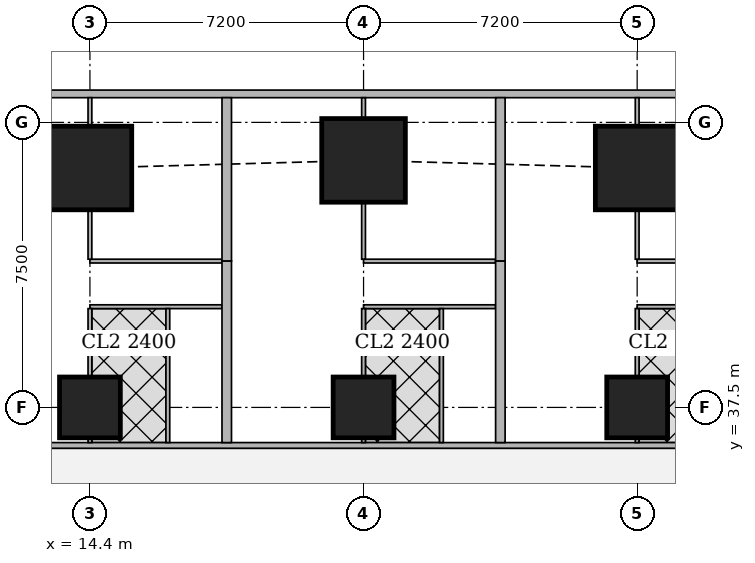
"""IFC4 building model, lengths in metres.
Left out: names, types, materials, properties, quantities, classifications, styles, units other than length and angle.
Written with IfcOpenShell. Run it as: python <this file> out.ifc"""

import sys

from ifc_helpers import new_model, si_unit, direction, frame, frame_2d, origin, origin_2d, place, context, subcontext, project, spatial, rectangle, extrude, element, fill, save


model = new_model("IFC4")
c1 = context("Model", 3, precision=1e-05, world=origin(), true_north=direction((0.0, 1.0)))
c2 = subcontext(c1, "Body", "Model", "MODEL_VIEW")
j1 = project(units=[si_unit("LENGTHUNIT", "METRE"), si_unit("PLANEANGLEUNIT", "RADIAN")], contexts=[c1])
p1 = place(None, origin())
s1 = spatial("IfcSite", under=j1, at=p1, CompositionType="ELEMENT")
p2 = place(p1, origin())
s2 = spatial("IfcBuilding", under=s1, at=p2, CompositionType="ELEMENT")
p3 = place(p2, frame((0.0, 0.0, 89.15)))
s3 = spatial("IfcBuildingStorey", under=s2, at=p3, CompositionType="ELEMENT", Elevation=89.15)
for number, where, z_axis, x_axis in (
    (1, (14.4, 37.5, 0.0), (0.0, 0.0, 1.0), (1.0, 0.0, 0.0)),
    (2, (21.6, 37.5, 0.0), (0.0, 0.0, 1.0), (1.0, 0.0, 0.0)),
    (3, (28.8, 37.5, 0.0), (0.0, 0.0, 1.0), (1.0, 0.0, 0.0)),
):
    element("IfcColumn", number, at=place(p3, frame(where, z_axis=z_axis, x_axis=x_axis)), inside=s3, PredefinedType="COLUMN", context=c2, shape_type="SweptSolid", body=[
        extrude(rectangle(XDim=1.6, YDim=1.6, at=origin_2d()), origin(), (0.0, 0.0, 1.0), 3.75),
    ])
for number, where, z_axis, x_axis in (
    (4, (14.4, 43.8, 0.0), (0.0, 0.0, 1.0), (1.0, 0.0, 0.0)),
    (5, (21.6, 44.0, 0.0), (0.0, 0.0, 1.0), (1.0, 0.0, 0.0)),
    (6, (28.8, 43.8, 0.0), (0.0, 0.0, 1.0), (1.0, 0.0, 0.0)),
):
    element("IfcColumn", number, at=place(p3, frame(where, z_axis=z_axis, x_axis=x_axis)), inside=s3, PredefinedType="COLUMN", context=c2, shape_type="SweptSolid", body=[
        extrude(rectangle(XDim=2.2, YDim=2.2, at=origin_2d()), origin(), (0.0, 0.0, 1.0), 3.75),
    ])
p4 = place(p3, frame((40.106, 45.75, 0.0), z_axis=(0.0, 0.0, 1.0), x_axis=(-1.0, 0.0, 0.0)))
e7 = element("IfcWall", 7, at=p4, inside=s3, PredefinedType="SOLIDWALL", context=c2, shape_type="SweptSolid", body=[
    extrude(rectangle(XDim=37.943, YDim=0.2, at=frame_2d((18.971, 0.0))), origin(), (0.0, 0.0, 1.0), 3.5),
])
p5 = place(p4, frame((8.606, 0.0, 0.9)))
e8 = element("IfcOpeningElement", 8, at=p5, cuts=e7, PredefinedType="OPENING", context=c2, shape_type="SweptSolid", body=[
    extrude(rectangle(XDim=1.8, YDim=1.5, at=frame_2d((0.9, 0.75))), frame((0.0, 0.11, 0.0), z_axis=(0.0, -1.0, 0.0), x_axis=(1.0, 0.0, 0.0)), (0.0, 0.0, 1.0), 0.22),
])
p6 = place(p4, frame((12.206, 0.0, 0.9)))
e9 = element("IfcOpeningElement", 9, at=p6, cuts=e7, PredefinedType="OPENING", context=c2, shape_type="SweptSolid", body=[
    extrude(rectangle(XDim=1.8, YDim=1.5, at=frame_2d((0.9, 0.75))), frame((0.0, 0.11, 0.0), z_axis=(0.0, -1.0, 0.0), x_axis=(1.0, 0.0, 0.0)), (0.0, 0.0, 1.0), 0.22),
])
p7 = place(p4, frame((15.806, 0.0, 0.9)))
e10 = element("IfcOpeningElement", 10, at=p7, cuts=e7, PredefinedType="OPENING", context=c2, shape_type="SweptSolid", body=[
    extrude(rectangle(XDim=1.8, YDim=1.5, at=frame_2d((0.9, 0.75))), frame((0.0, 0.11, 0.0), z_axis=(0.0, -1.0, 0.0), x_axis=(1.0, 0.0, 0.0)), (0.0, 0.0, 1.0), 0.22),
])
p8 = place(p4, frame((19.406, 0.0, 0.9)))
e11 = element("IfcOpeningElement", 11, at=p8, cuts=e7, PredefinedType="OPENING", context=c2, shape_type="SweptSolid", body=[
    extrude(rectangle(XDim=1.8, YDim=1.5, at=frame_2d((0.9, 0.75))), frame((0.0, 0.11, 0.0), z_axis=(0.0, -1.0, 0.0), x_axis=(1.0, 0.0, 0.0)), (0.0, 0.0, 1.0), 0.22),
])
p9 = place(p4, frame((23.006, 0.0, 0.9)))
e12 = element("IfcOpeningElement", 12, at=p9, cuts=e7, PredefinedType="OPENING", context=c2, shape_type="SweptSolid", body=[
    extrude(rectangle(XDim=1.8, YDim=1.5, at=frame_2d((0.9, 0.75))), frame((0.0, 0.11, 0.0), z_axis=(0.0, -1.0, 0.0), x_axis=(1.0, 0.0, 0.0)), (0.0, 0.0, 1.0), 0.22),
])
p10 = place(p4, frame((26.606, 0.0, 0.9)))
e13 = element("IfcOpeningElement", 13, at=p10, cuts=e7, PredefinedType="OPENING", context=c2, shape_type="SweptSolid", body=[
    extrude(rectangle(XDim=1.8, YDim=1.5, at=frame_2d((0.9, 0.75))), frame((0.0, 0.11, 0.0), z_axis=(0.0, -1.0, 0.0), x_axis=(1.0, 0.0, 0.0)), (0.0, 0.0, 1.0), 0.22),
])
p11 = place(p3, frame((8.35, 36.5, 0.0), z_axis=(0.0, 0.0, 1.0), x_axis=(1.0, 0.0, 0.0)))
e14 = element("IfcWall", 14, at=p11, inside=s3, PredefinedType="SOLIDWALL", context=c2, shape_type="SweptSolid", body=[
    extrude(rectangle(XDim=26.415, YDim=0.15, at=frame_2d((13.208, 0.0))), origin(), (0.0, 0.0, 1.0), 3.5),
])
p12 = place(p11, frame((2.6, 0.0, 0.0)))
e15 = element("IfcOpeningElement", 15, at=p12, cuts=e14, PredefinedType="OPENING", context=c2, shape_type="SweptSolid", body=[
    extrude(rectangle(XDim=1.0, YDim=2.1, at=frame_2d((0.5, 1.05))), frame((0.0, 0.085, 0.0), z_axis=(0.0, -1.0, 0.0), x_axis=(1.0, 0.0, 0.0)), (0.0, 0.0, 1.0), 0.17),
])
p13 = place(p11, frame((10.75, 0.0, 0.0)))
e16 = element("IfcOpeningElement", 16, at=p13, cuts=e14, PredefinedType="OPENING", context=c2, shape_type="SweptSolid", body=[
    extrude(rectangle(XDim=1.0, YDim=2.1, at=frame_2d((0.5, 1.05))), frame((0.0, 0.085, 0.0), z_axis=(0.0, -1.0, 0.0), x_axis=(1.0, 0.0, 0.0)), (0.0, 0.0, 1.0), 0.17),
])
p14 = place(p11, frame((18.007, 0.0, 0.0)))
e17 = element("IfcOpeningElement", 17, at=p14, cuts=e14, PredefinedType="OPENING", context=c2, shape_type="SweptSolid", body=[
    extrude(rectangle(XDim=1.0, YDim=2.1, at=frame_2d((0.5, 1.05))), frame((0.0, 0.085, 0.0), z_axis=(0.0, -1.0, 0.0), x_axis=(1.0, 0.0, 0.0)), (0.0, 0.0, 1.0), 0.17),
])
p15 = place(p3, frame((14.4, 41.35, 0.0), z_axis=(0.0, 0.0, 1.0), x_axis=(1.0, 0.0, 0.0)))
e18 = element("IfcWall", 18, at=p15, inside=s3, PredefinedType="PARTITIONING", context=c2, shape_type="SweptSolid", body=[
    extrude(rectangle(XDim=3.475, YDim=0.1, at=frame_2d((1.738, 0.0))), origin(), (0.0, 0.0, 1.0), 3.5),
])
p16 = place(p15, frame((0.2, 0.0, 0.0)))
e19 = element("IfcOpeningElement", 19, at=p16, cuts=e18, PredefinedType="OPENING", context=c2, shape_type="SweptSolid", body=[
    extrude(rectangle(XDim=0.9, YDim=2.1, at=frame_2d((0.45, 1.05))), frame((0.0, 0.06, 0.0), z_axis=(0.0, -1.0, 0.0), x_axis=(1.0, 0.0, 0.0)), (0.0, 0.0, 1.0), 0.12),
])
p17 = place(p3, frame((14.4, 40.15, 0.0), z_axis=(0.0, 0.0, 1.0), x_axis=(1.0, 0.0, 0.0)))
e20 = element("IfcWall", 20, at=p17, inside=s3, PredefinedType="PARTITIONING", context=c2, shape_type="SweptSolid", body=[
    extrude(rectangle(XDim=3.475, YDim=0.1, at=frame_2d((1.738, 0.0))), origin(), (0.0, 0.0, 1.0), 3.5),
])
p18 = place(p17, frame((0.575, 0.0, 0.0)))
e21 = element("IfcOpeningElement", 21, at=p18, cuts=e20, PredefinedType="OPENING", context=c2, shape_type="SweptSolid", body=[
    extrude(rectangle(XDim=0.9, YDim=2.1, at=frame_2d((0.45, 1.05))), frame((0.0, 0.06, 0.0), z_axis=(0.0, -1.0, 0.0), x_axis=(1.0, 0.0, 0.0)), (0.0, 0.0, 1.0), 0.12),
])
p19 = place(p17, frame((2.375, 0.0, 0.0)))
e22 = element("IfcOpeningElement", 22, at=p19, cuts=e20, PredefinedType="OPENING", context=c2, shape_type="SweptSolid", body=[
    extrude(rectangle(XDim=0.9, YDim=2.1, at=frame_2d((0.45, 1.05))), frame((0.0, 0.06, 0.0), z_axis=(0.0, -1.0, 0.0), x_axis=(1.0, 0.0, 0.0)), (0.0, 0.0, 1.0), 0.12),
])
p20 = place(p3, frame((14.4, 41.4, 0.0), z_axis=(0.0, 0.0, 1.0), x_axis=(0.0, 1.0, 0.0)))
e23 = element("IfcWall", 23, at=p20, inside=s3, PredefinedType="PARTITIONING", context=c2, shape_type="SweptSolid", body=[
    extrude(rectangle(XDim=1.299, YDim=0.1, at=frame_2d((0.649, 0.0))), origin(), (0.0, 0.0, 1.0), 3.5),
])
p21 = place(p3, frame((14.4, 44.901, 0.0), z_axis=(0.0, 0.0, 1.0), x_axis=(0.0, 1.0, 0.0)))
e24 = element("IfcWall", 24, at=p21, inside=s3, PredefinedType="PARTITIONING", context=c2, shape_type="SweptSolid", body=[
    extrude(rectangle(XDim=0.749, YDim=0.1, at=frame_2d((0.375, 0.0))), origin(), (0.0, 0.0, 1.0), 3.5),
])
p22 = place(p3, frame((14.4, 36.575, 0.0), z_axis=(0.0, 0.0, 1.0), x_axis=(0.0, 1.0, 0.0)))
e25 = element("IfcWall", 25, at=p22, inside=s3, PredefinedType="PARTITIONING", context=c2, shape_type="SweptSolid", body=[
    extrude(rectangle(XDim=0.124, YDim=0.1, at=frame_2d((0.062, 0.0))), origin(), (0.0, 0.0, 1.0), 3.5),
])
p23 = place(p3, frame((14.4, 38.301, 0.0), z_axis=(0.0, 0.0, 1.0), x_axis=(0.0, 1.0, 0.0)))
e26 = element("IfcWall", 26, at=p23, inside=s3, PredefinedType="PARTITIONING", context=c2, shape_type="SweptSolid", body=[
    extrude(rectangle(XDim=1.799, YDim=0.1, at=frame_2d((0.899, 0.0))), origin(), (0.0, 0.0, 1.0), 3.5),
])
p24 = place(p3, frame((16.45, 36.575, 0.0), z_axis=(0.0, 0.0, 1.0), x_axis=(0.0, 1.0, 0.0)))
e27 = element("IfcWall", 27, at=p24, inside=s3, PredefinedType="PARTITIONING", context=c2, shape_type="SweptSolid", body=[
    extrude(rectangle(XDim=3.525, YDim=0.1, at=frame_2d((1.763, 0.0))), origin(), (0.0, 0.0, 1.0), 3.5),
])
p25 = place(p3, frame((21.6, 41.35, 0.0), z_axis=(0.0, 0.0, 1.0), x_axis=(1.0, 0.0, 0.0)))
e28 = element("IfcWall", 28, at=p25, inside=s3, PredefinedType="PARTITIONING", context=c2, shape_type="SweptSolid", body=[
    extrude(rectangle(XDim=3.475, YDim=0.1, at=frame_2d((1.737, 0.0))), origin(), (0.0, 0.0, 1.0), 3.5),
])
p26 = place(p25, frame((0.2, 0.0, 0.0)))
e29 = element("IfcOpeningElement", 29, at=p26, cuts=e28, PredefinedType="OPENING", context=c2, shape_type="SweptSolid", body=[
    extrude(rectangle(XDim=0.9, YDim=2.1, at=frame_2d((0.45, 1.05))), frame((0.0, 0.06, 0.0), z_axis=(0.0, -1.0, 0.0), x_axis=(1.0, 0.0, 0.0)), (0.0, 0.0, 1.0), 0.12),
])
p27 = place(p3, frame((21.6, 40.15, 0.0), z_axis=(0.0, 0.0, 1.0), x_axis=(1.0, 0.0, 0.0)))
e30 = element("IfcWall", 30, at=p27, inside=s3, PredefinedType="PARTITIONING", context=c2, shape_type="SweptSolid", body=[
    extrude(rectangle(XDim=3.475, YDim=0.1, at=frame_2d((1.737, 0.0))), origin(), (0.0, 0.0, 1.0), 3.5),
])
p28 = place(p27, frame((0.575, 0.0, 0.0)))
e31 = element("IfcOpeningElement", 31, at=p28, cuts=e30, PredefinedType="OPENING", context=c2, shape_type="SweptSolid", body=[
    extrude(rectangle(XDim=0.9, YDim=2.1, at=frame_2d((0.45, 1.05))), frame((0.0, 0.06, 0.0), z_axis=(0.0, -1.0, 0.0), x_axis=(1.0, 0.0, 0.0)), (0.0, 0.0, 1.0), 0.12),
])
p29 = place(p27, frame((2.375, 0.0, 0.0)))
e32 = element("IfcOpeningElement", 32, at=p29, cuts=e30, PredefinedType="OPENING", context=c2, shape_type="SweptSolid", body=[
    extrude(rectangle(XDim=0.9, YDim=2.1, at=frame_2d((0.45, 1.05))), frame((0.0, 0.06, 0.0), z_axis=(0.0, -1.0, 0.0), x_axis=(1.0, 0.0, 0.0)), (0.0, 0.0, 1.0), 0.12),
])
p30 = place(p3, frame((21.6, 41.4, 0.0), z_axis=(0.0, 0.0, 1.0), x_axis=(0.0, 1.0, 0.0)))
e33 = element("IfcWall", 33, at=p30, inside=s3, PredefinedType="PARTITIONING", context=c2, shape_type="SweptSolid", body=[
    extrude(rectangle(XDim=1.499, YDim=0.1, at=frame_2d((0.75, 0.0))), origin(), (0.0, 0.0, 1.0), 3.5),
])
p31 = place(p3, frame((21.6, 45.101, 0.0), z_axis=(0.0, 0.0, 1.0), x_axis=(0.0, 1.0, 0.0)))
e34 = element("IfcWall", 34, at=p31, inside=s3, PredefinedType="PARTITIONING", context=c2, shape_type="SweptSolid", body=[
    extrude(rectangle(XDim=0.549, YDim=0.1, at=frame_2d((0.274, 0.0))), origin(), (0.0, 0.0, 1.0), 3.5),
])
p32 = place(p3, frame((21.6, 36.575, 0.0), z_axis=(0.0, 0.0, 1.0), x_axis=(0.0, 1.0, 0.0)))
e35 = element("IfcWall", 35, at=p32, inside=s3, PredefinedType="PARTITIONING", context=c2, shape_type="SweptSolid", body=[
    extrude(rectangle(XDim=0.124, YDim=0.1, at=frame_2d((0.062, 0.0))), origin(), (0.0, 0.0, 1.0), 3.5),
])
p33 = place(p3, frame((21.6, 38.301, 0.0), z_axis=(0.0, 0.0, 1.0), x_axis=(0.0, 1.0, 0.0)))
e36 = element("IfcWall", 36, at=p33, inside=s3, PredefinedType="PARTITIONING", context=c2, shape_type="SweptSolid", body=[
    extrude(rectangle(XDim=1.799, YDim=0.1, at=frame_2d((0.899, 0.0))), origin(), (0.0, 0.0, 1.0), 3.5),
])
p34 = place(p3, frame((23.65, 36.575, 0.0), z_axis=(0.0, 0.0, 1.0), x_axis=(0.0, 1.0, 0.0)))
e37 = element("IfcWall", 37, at=p34, inside=s3, PredefinedType="PARTITIONING", context=c2, shape_type="SweptSolid", body=[
    extrude(rectangle(XDim=3.525, YDim=0.1, at=frame_2d((1.763, 0.0))), origin(), (0.0, 0.0, 1.0), 3.5),
])
p35 = place(p3, frame((18.0, 41.35, 0.0), z_axis=(0.0, 0.0, 1.0), x_axis=(0.0, 1.0, 0.0)))
e38 = element("IfcWall", 38, at=p35, inside=s3, PredefinedType="SOLIDWALL", context=c2, shape_type="SweptSolid", body=[
    extrude(rectangle(XDim=4.3, YDim=0.25, at=frame_2d((2.15, 0.0))), origin(), (0.0, 0.0, 1.0), 2.2),
])
p36 = place(p3, frame((18.0, 36.575, 0.0), z_axis=(0.0, 0.0, 1.0), x_axis=(0.0, 1.0, 0.0)))
e39 = element("IfcWall", 39, at=p36, inside=s3, PredefinedType="SOLIDWALL", context=c2, shape_type="SweptSolid", body=[
    extrude(rectangle(XDim=4.775, YDim=0.25, at=frame_2d((2.388, 0.0))), origin(), (0.0, 0.0, 1.0), 3.5),
])
p37 = place(p3, frame((28.8, 41.35, 0.0), z_axis=(0.0, 0.0, 1.0), x_axis=(1.0, 0.0, 0.0)))
e40 = element("IfcWall", 40, at=p37, inside=s3, PredefinedType="PARTITIONING", context=c2, shape_type="SweptSolid", body=[
    extrude(rectangle(XDim=5.053, YDim=0.1, at=frame_2d((2.526, 0.0))), origin(), (0.0, 0.0, 1.0), 3.5),
])
p38 = place(p37, frame((0.2, 0.0, 0.0)))
e41 = element("IfcOpeningElement", 41, at=p38, cuts=e40, PredefinedType="OPENING", context=c2, shape_type="SweptSolid", body=[
    extrude(rectangle(XDim=0.9, YDim=2.1, at=frame_2d((0.45, 1.05))), frame((0.0, 0.06, 0.0), z_axis=(0.0, -1.0, 0.0), x_axis=(1.0, 0.0, 0.0)), (0.0, 0.0, 1.0), 0.12),
])
p39 = place(p3, frame((28.8, 40.15, 0.0), z_axis=(0.0, 0.0, 1.0), x_axis=(1.0, 0.0, 0.0)))
e42 = element("IfcWall", 42, at=p39, inside=s3, PredefinedType="PARTITIONING", context=c2, shape_type="SweptSolid", body=[
    extrude(rectangle(XDim=5.28, YDim=0.1, at=frame_2d((2.64, 0.0))), origin(), (0.0, 0.0, 1.0), 3.5),
])
p40 = place(p39, frame((0.575, 0.0, 0.0)))
e43 = element("IfcOpeningElement", 43, at=p40, cuts=e42, PredefinedType="OPENING", context=c2, shape_type="SweptSolid", body=[
    extrude(rectangle(XDim=0.9, YDim=2.1, at=frame_2d((0.45, 1.05))), frame((0.0, 0.06, 0.0), z_axis=(0.0, -1.0, 0.0), x_axis=(1.0, 0.0, 0.0)), (0.0, 0.0, 1.0), 0.12),
])
p41 = place(p39, frame((4.23, 0.0, 0.0)))
e44 = element("IfcOpeningElement", 44, at=p41, cuts=e42, PredefinedType="OPENING", context=c2, shape_type="SweptSolid", body=[
    extrude(rectangle(XDim=0.9, YDim=2.1, at=frame_2d((0.45, 1.05))), frame((0.0, 0.06, 0.0), z_axis=(0.0, -1.0, 0.0), x_axis=(1.0, 0.0, 0.0)), (0.0, 0.0, 1.0), 0.12),
])
p42 = place(p39, frame((2.375, 0.0, 0.0)))
e45 = element("IfcOpeningElement", 45, at=p42, cuts=e42, PredefinedType="OPENING", context=c2, shape_type="SweptSolid", body=[
    extrude(rectangle(XDim=0.9, YDim=2.1, at=frame_2d((0.45, 1.05))), frame((0.0, 0.06, 0.0), z_axis=(0.0, -1.0, 0.0), x_axis=(1.0, 0.0, 0.0)), (0.0, 0.0, 1.0), 0.12),
])
p43 = place(p3, frame((28.8, 41.4, 0.0), z_axis=(0.0, 0.0, 1.0), x_axis=(0.0, 1.0, 0.0)))
e46 = element("IfcWall", 46, at=p43, inside=s3, PredefinedType="PARTITIONING", context=c2, shape_type="SweptSolid", body=[
    extrude(rectangle(XDim=1.299, YDim=0.1, at=frame_2d((0.649, 0.0))), origin(), (0.0, 0.0, 1.0), 3.5),
])
p44 = place(p3, frame((28.8, 44.901, 0.0), z_axis=(0.0, 0.0, 1.0), x_axis=(0.0, 1.0, 0.0)))
e47 = element("IfcWall", 47, at=p44, inside=s3, PredefinedType="PARTITIONING", context=c2, shape_type="SweptSolid", body=[
    extrude(rectangle(XDim=0.749, YDim=0.1, at=frame_2d((0.375, 0.0))), origin(), (0.0, 0.0, 1.0), 3.5),
])
p45 = place(p3, frame((28.8, 36.575, 0.0), z_axis=(0.0, 0.0, 1.0), x_axis=(0.0, 1.0, 0.0)))
e48 = element("IfcWall", 48, at=p45, inside=s3, PredefinedType="PARTITIONING", context=c2, shape_type="SweptSolid", body=[
    extrude(rectangle(XDim=0.124, YDim=0.1, at=frame_2d((0.062, 0.0))), origin(), (0.0, 0.0, 1.0), 3.5),
])
p46 = place(p3, frame((28.8, 38.301, 0.0), z_axis=(0.0, 0.0, 1.0), x_axis=(0.0, 1.0, 0.0)))
e49 = element("IfcWall", 49, at=p46, inside=s3, PredefinedType="PARTITIONING", context=c2, shape_type="SweptSolid", body=[
    extrude(rectangle(XDim=1.799, YDim=0.1, at=frame_2d((0.899, 0.0))), origin(), (0.0, 0.0, 1.0), 3.5),
])
p47 = place(p3, frame((25.2, 41.35, 0.0), z_axis=(0.0, 0.0, 1.0), x_axis=(0.0, 1.0, 0.0)))
e50 = element("IfcWall", 50, at=p47, inside=s3, PredefinedType="SOLIDWALL", context=c2, shape_type="SweptSolid", body=[
    extrude(rectangle(XDim=4.3, YDim=0.25, at=frame_2d((2.15, 0.0))), origin(), (0.0, 0.0, 1.0), 2.2),
])
p48 = place(p3, frame((25.2, 36.575, 0.0), z_axis=(0.0, 0.0, 1.0), x_axis=(0.0, 1.0, 0.0)))
e51 = element("IfcWall", 51, at=p48, inside=s3, PredefinedType="SOLIDWALL", context=c2, shape_type="SweptSolid", body=[
    extrude(rectangle(XDim=4.775, YDim=0.25, at=frame_2d((2.388, 0.0))), origin(), (0.0, 0.0, 1.0), 3.5),
])
p49 = place(p5, origin())
e52 = element("IfcWindow", 52, at=p49, inside=s3, PartitioningType="SINGLE_PANEL", PredefinedType="WINDOW", context=c2, shape_type="SweptSolid", body=[
    extrude(rectangle(XDim=1.8, YDim=1.5, at=frame_2d((0.9, 0.75))), frame((0.0, 0.03, 0.0), z_axis=(0.0, -1.0, 0.0), x_axis=(1.0, 0.0, 0.0)), (0.0, 0.0, 1.0), 0.06),
])
fill(e8, e52)
p50 = place(p6, origin())
e53 = element("IfcWindow", 53, at=p50, inside=s3, PartitioningType="SINGLE_PANEL", PredefinedType="WINDOW", context=c2, shape_type="SweptSolid", body=[
    extrude(rectangle(XDim=1.8, YDim=1.5, at=frame_2d((0.9, 0.75))), frame((0.0, 0.03, 0.0), z_axis=(0.0, -1.0, 0.0), x_axis=(1.0, 0.0, 0.0)), (0.0, 0.0, 1.0), 0.06),
])
fill(e9, e53)
p51 = place(p7, origin())
e54 = element("IfcWindow", 54, at=p51, inside=s3, PartitioningType="SINGLE_PANEL", PredefinedType="WINDOW", context=c2, shape_type="SweptSolid", body=[
    extrude(rectangle(XDim=1.8, YDim=1.5, at=frame_2d((0.9, 0.75))), frame((0.0, 0.03, 0.0), z_axis=(0.0, -1.0, 0.0), x_axis=(1.0, 0.0, 0.0)), (0.0, 0.0, 1.0), 0.06),
])
fill(e10, e54)
p52 = place(p8, origin())
e55 = element("IfcWindow", 55, at=p52, inside=s3, PartitioningType="SINGLE_PANEL", PredefinedType="WINDOW", context=c2, shape_type="SweptSolid", body=[
    extrude(rectangle(XDim=1.8, YDim=1.5, at=frame_2d((0.9, 0.75))), frame((0.0, 0.03, 0.0), z_axis=(0.0, -1.0, 0.0), x_axis=(1.0, 0.0, 0.0)), (0.0, 0.0, 1.0), 0.06),
])
fill(e11, e55)
p53 = place(p9, origin())
e56 = element("IfcWindow", 56, at=p53, inside=s3, PartitioningType="SINGLE_PANEL", PredefinedType="WINDOW", context=c2, shape_type="SweptSolid", body=[
    extrude(rectangle(XDim=1.8, YDim=1.5, at=frame_2d((0.9, 0.75))), frame((0.0, 0.03, 0.0), z_axis=(0.0, -1.0, 0.0), x_axis=(1.0, 0.0, 0.0)), (0.0, 0.0, 1.0), 0.06),
])
fill(e12, e56)
p54 = place(p10, origin())
e57 = element("IfcWindow", 57, at=p54, inside=s3, PartitioningType="SINGLE_PANEL", PredefinedType="WINDOW", context=c2, shape_type="SweptSolid", body=[
    extrude(rectangle(XDim=1.8, YDim=1.5, at=frame_2d((0.9, 0.75))), frame((0.0, 0.03, 0.0), z_axis=(0.0, -1.0, 0.0), x_axis=(1.0, 0.0, 0.0)), (0.0, 0.0, 1.0), 0.06),
])
fill(e13, e57)
p55 = place(p16, origin())
e58 = element("IfcDoor", 58, at=p55, inside=s3, OperationType="SINGLE_SWING_LEFT", PredefinedType="DOOR", context=c2, shape_type="SweptSolid", body=[
    extrude(rectangle(XDim=0.9, YDim=2.1, at=frame_2d((0.45, 1.05))), frame((0.0, 0.025, 0.0), z_axis=(0.0, -1.0, 0.0), x_axis=(1.0, 0.0, 0.0)), (0.0, 0.0, 1.0), 0.05),
])
fill(e19, e58)
p56 = place(p18, origin())
e59 = element("IfcDoor", 59, at=p56, inside=s3, OperationType="SINGLE_SWING_RIGHT", PredefinedType="DOOR", context=c2, shape_type="SweptSolid", body=[
    extrude(rectangle(XDim=0.9, YDim=2.1, at=frame_2d((0.45, 1.05))), frame((0.0, 0.025, 0.0), z_axis=(0.0, -1.0, 0.0), x_axis=(1.0, 0.0, 0.0)), (0.0, 0.0, 1.0), 0.05),
])
fill(e21, e59)
p57 = place(p19, origin())
e60 = element("IfcDoor", 60, at=p57, inside=s3, OperationType="SINGLE_SWING_LEFT", PredefinedType="DOOR", context=c2, shape_type="SweptSolid", body=[
    extrude(rectangle(XDim=0.9, YDim=2.1, at=frame_2d((0.45, 1.05))), frame((0.0, 0.025, 0.0), z_axis=(0.0, -1.0, 0.0), x_axis=(1.0, 0.0, 0.0)), (0.0, 0.0, 1.0), 0.05),
])
fill(e22, e60)
p58 = place(p26, origin())
e61 = element("IfcDoor", 61, at=p58, inside=s3, OperationType="SINGLE_SWING_LEFT", PredefinedType="DOOR", context=c2, shape_type="SweptSolid", body=[
    extrude(rectangle(XDim=0.9, YDim=2.1, at=frame_2d((0.45, 1.05))), frame((0.0, 0.025, 0.0), z_axis=(0.0, -1.0, 0.0), x_axis=(1.0, 0.0, 0.0)), (0.0, 0.0, 1.0), 0.05),
])
fill(e29, e61)
p59 = place(p28, origin())
e62 = element("IfcDoor", 62, at=p59, inside=s3, OperationType="SINGLE_SWING_RIGHT", PredefinedType="DOOR", context=c2, shape_type="SweptSolid", body=[
    extrude(rectangle(XDim=0.9, YDim=2.1, at=frame_2d((0.45, 1.05))), frame((0.0, 0.025, 0.0), z_axis=(0.0, -1.0, 0.0), x_axis=(1.0, 0.0, 0.0)), (0.0, 0.0, 1.0), 0.05),
])
fill(e31, e62)
p60 = place(p29, origin())
e63 = element("IfcDoor", 63, at=p60, inside=s3, OperationType="SINGLE_SWING_LEFT", PredefinedType="DOOR", context=c2, shape_type="SweptSolid", body=[
    extrude(rectangle(XDim=0.9, YDim=2.1, at=frame_2d((0.45, 1.05))), frame((0.0, 0.025, 0.0), z_axis=(0.0, -1.0, 0.0), x_axis=(1.0, 0.0, 0.0)), (0.0, 0.0, 1.0), 0.05),
])
fill(e32, e63)
p61 = place(p13, origin())
e64 = element("IfcDoor", 64, at=p61, inside=s3, OperationType="SINGLE_SWING_LEFT", PredefinedType="DOOR", context=c2, shape_type="SweptSolid", body=[
    extrude(rectangle(XDim=1.0, YDim=2.1, at=frame_2d((0.5, 1.05))), frame((0.0, 0.025, 0.0), z_axis=(0.0, -1.0, 0.0), x_axis=(1.0, 0.0, 0.0)), (0.0, 0.0, 1.0), 0.05),
])
fill(e16, e64)
p62 = place(p38, origin())
e65 = element("IfcDoor", 65, at=p62, inside=s3, OperationType="SINGLE_SWING_RIGHT", PredefinedType="DOOR", context=c2, shape_type="SweptSolid", body=[
    extrude(rectangle(XDim=0.9, YDim=2.1, at=frame_2d((0.45, 1.05))), frame((0.0, 0.025, 0.0), z_axis=(0.0, -1.0, 0.0), x_axis=(1.0, 0.0, 0.0)), (0.0, 0.0, 1.0), 0.05),
])
fill(e41, e65)
p63 = place(p40, origin())
e66 = element("IfcDoor", 66, at=p63, inside=s3, OperationType="SINGLE_SWING_RIGHT", PredefinedType="DOOR", context=c2, shape_type="SweptSolid", body=[
    extrude(rectangle(XDim=0.9, YDim=2.1, at=frame_2d((0.45, 1.05))), frame((0.0, 0.025, 0.0), z_axis=(0.0, -1.0, 0.0), x_axis=(1.0, 0.0, 0.0)), (0.0, 0.0, 1.0), 0.05),
])
fill(e43, e66)
p64 = place(p14, origin())
e67 = element("IfcDoor", 67, at=p64, inside=s3, OperationType="SINGLE_SWING_LEFT", PredefinedType="DOOR", context=c2, shape_type="SweptSolid", body=[
    extrude(rectangle(XDim=1.0, YDim=2.1, at=frame_2d((0.5, 1.05))), frame((0.0, 0.025, 0.0), z_axis=(0.0, -1.0, 0.0), x_axis=(1.0, 0.0, 0.0)), (0.0, 0.0, 1.0), 0.05),
])
fill(e17, e67)
save(model, sys.argv[1])
